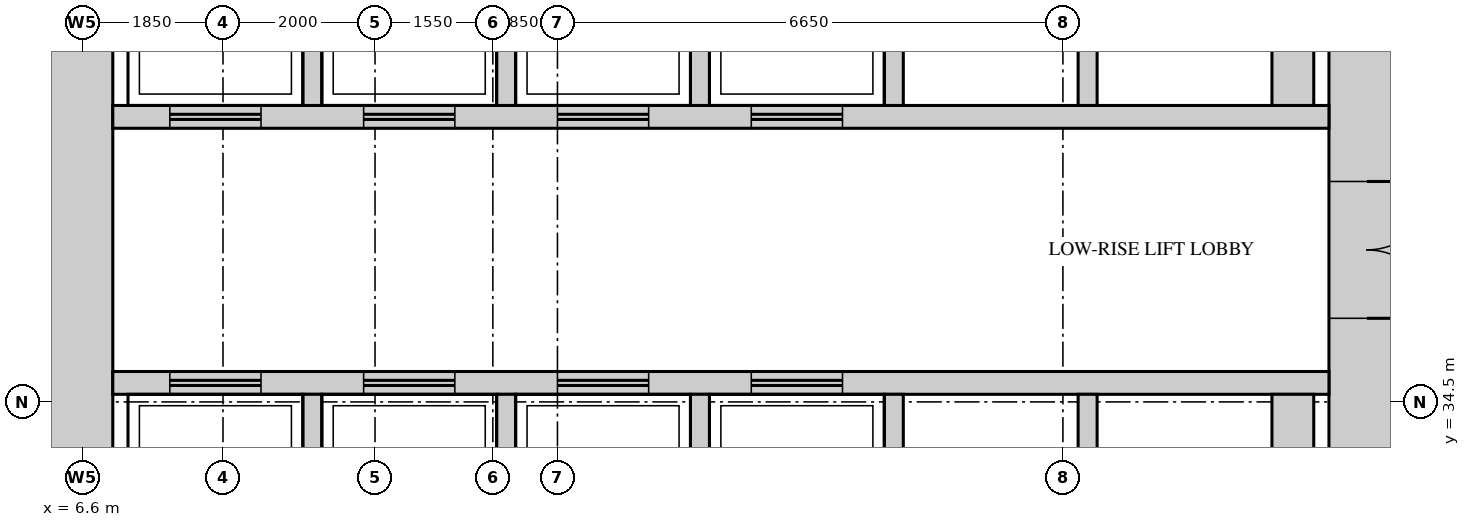
"""IFC4 building model, lengths in metres.
Left out: names, types, materials, properties, quantities, classifications, styles, units other than length and angle.
Written with IfcOpenShell. Run it as: python <this file> out.ifc"""

import sys

from ifc_helpers import new_model, si_unit, direction, frame, frame_2d, origin, place, context, subcontext, project, spatial, rectangle, extrude, source, transform, mapped, element, fill, save


model = new_model("IFC4")
c1 = context("Model", 3, precision=1e-05, world=origin(), true_north=direction((0.0, 1.0)))
c2 = subcontext(c1, "Body", "Model", "MODEL_VIEW")
j1 = project(units=[si_unit("LENGTHUNIT", "METRE"), si_unit("PLANEANGLEUNIT", "RADIAN")], contexts=[c1])
p1 = place(None, origin())
s1 = spatial("IfcSite", under=j1, at=p1, CompositionType="ELEMENT")
p2 = place(p1, origin())
s2 = spatial("IfcBuilding", under=s1, at=p2, CompositionType="ELEMENT")
p3 = place(p2, frame((0.0, 0.0, 132.3)))
s3 = spatial("IfcBuildingStorey", under=s2, at=p3, CompositionType="ELEMENT", Elevation=132.3)
m1 = source(origin(), c2, "Body", "SweptSolid", [
    extrude(rectangle(XDim=28.0, YDim=1.0, at=frame_2d((14.0, 0.0))), origin(), (0.0, 0.0, 1.0), 4.1),
])
p4 = place(p3, frame((23.5, 13.0, 0.0), z_axis=(0.0, 0.0, 1.0), x_axis=(0.0, 1.0, 0.0)))
e1 = element("IfcWall", 1, at=p4, inside=s3, PredefinedType="SHEAR", context=c2, shape_type="MappedRepresentation", body=[
    mapped(m1, transform((0.0, 0.0, 0.0))),
])
m2 = source(origin(), c2, "Body", "SweptSolid", [
    extrude(rectangle(XDim=1.8, YDim=2.1, at=frame_2d((0.9, 1.05))), frame((0.0, 0.51, 0.0), z_axis=(0.0, -1.0, 0.0), x_axis=(1.0, 0.0, 0.0)), (0.0, 0.0, 1.0), 1.02),
])
p5 = place(p4, frame((22.6, 0.0, 0.0)))
e2 = element("IfcOpeningElement", 2, at=p5, cuts=e1, PredefinedType="OPENING", context=c2, shape_type="MappedRepresentation", body=[
    mapped(m2, transform((0.0, 0.0, 0.0))),
])
m3 = source(origin(), c2, "Body", "SweptSolid", [
    extrude(rectangle(XDim=1.2, YDim=2.1, at=frame_2d((0.6, 1.05))), frame((0.0, 0.51, 0.0), z_axis=(0.0, -1.0, 0.0), x_axis=(1.0, 0.0, 0.0)), (0.0, 0.0, 1.0), 1.02),
])
p6 = place(p4, frame((15.35, 0.0, 0.0)))
e3 = element("IfcOpeningElement", 3, at=p6, cuts=e1, PredefinedType="OPENING", context=c2, shape_type="MappedRepresentation", body=[
    mapped(m3, transform((0.0, 0.0, 0.0))),
])
m4 = source(origin(), c2, "Body", "SweptSolid", [
    extrude(rectangle(XDim=0.9, YDim=2.1, at=frame_2d((0.45, 1.05))), frame((0.0, 0.51, 0.0), z_axis=(0.0, -1.0, 0.0), x_axis=(1.0, 0.0, 0.0)), (0.0, 0.0, 1.0), 1.02),
])
p7 = place(p4, frame((1.35, 0.0, 0.0)))
e4 = element("IfcOpeningElement", 4, at=p7, cuts=e1, PredefinedType="OPENING", context=c2, shape_type="MappedRepresentation", body=[
    mapped(m4, transform((0.0, 0.0, 0.0))),
])
p8 = place(p4, frame((4.55, 0.0, 0.0)))
e5 = element("IfcOpeningElement", 5, at=p8, cuts=e1, PredefinedType="OPENING", context=c2, shape_type="MappedRepresentation", body=[
    mapped(m4, transform((0.0, 0.0, 0.0))),
])
p9 = place(p4, frame((7.8, 0.0, 0.0)))
e6 = element("IfcOpeningElement", 6, at=p9, cuts=e1, PredefinedType="OPENING", context=c2, shape_type="MappedRepresentation", body=[
    mapped(m4, transform((0.0, 0.0, 0.0))),
])
p10 = place(p3, frame((6.5, 13.0, 0.0), z_axis=(0.0, 0.0, 1.0), x_axis=(0.0, 1.0, 0.0)))
e7 = element("IfcWall", 7, at=p10, inside=s3, PredefinedType="SHEAR", context=c2, shape_type="MappedRepresentation", body=[
    mapped(m1, transform((0.0, 0.0, 0.0))),
])
m5 = source(origin(), c2, "Body", "SweptSolid", [
    extrude(rectangle(XDim=16.0, YDim=0.3, at=frame_2d((8.0, 0.0))), origin(), (0.0, 0.0, 1.0), 4.1),
])
p11 = place(p3, frame((7.0, 38.25, 0.0), z_axis=(0.0, 0.0, 1.0), x_axis=(1.0, 0.0, 0.0)))
e8 = element("IfcWall", 8, at=p11, inside=s3, PredefinedType="STANDARD", context=c2, shape_type="MappedRepresentation", body=[
    mapped(m5, transform((0.0, 0.0, 0.0))),
])
m6 = source(origin(), c2, "Body", "SweptSolid", [
    extrude(rectangle(XDim=1.2, YDim=2.1, at=frame_2d((0.6, 1.05))), frame((0.0, 0.16, 0.0), z_axis=(0.0, -1.0, 0.0), x_axis=(1.0, 0.0, 0.0)), (0.0, 0.0, 1.0), 0.32),
])
p12 = place(p11, frame((0.75, 0.0, 0.0)))
e9 = element("IfcOpeningElement", 9, at=p12, cuts=e8, PredefinedType="OPENING", context=c2, shape_type="MappedRepresentation", body=[
    mapped(m6, transform((0.0, 0.0, 0.0))),
])
p13 = place(p11, frame((3.3, 0.0, 0.0)))
e10 = element("IfcOpeningElement", 10, at=p13, cuts=e8, PredefinedType="OPENING", context=c2, shape_type="MappedRepresentation", body=[
    mapped(m6, transform((0.0, 0.0, 0.0))),
])
p14 = place(p11, frame((5.85, 0.0, 0.0)))
e11 = element("IfcOpeningElement", 11, at=p14, cuts=e8, PredefinedType="OPENING", context=c2, shape_type="MappedRepresentation", body=[
    mapped(m6, transform((0.0, 0.0, 0.0))),
])
p15 = place(p11, frame((8.4, 0.0, 0.0)))
e12 = element("IfcOpeningElement", 12, at=p15, cuts=e8, PredefinedType="OPENING", context=c2, shape_type="MappedRepresentation", body=[
    mapped(m6, transform((0.0, 0.0, 0.0))),
])
p16 = place(p3, frame((7.0, 34.75, 0.0), z_axis=(0.0, 0.0, 1.0), x_axis=(1.0, 0.0, 0.0)))
e13 = element("IfcWall", 13, at=p16, inside=s3, PredefinedType="STANDARD", context=c2, shape_type="MappedRepresentation", body=[
    mapped(m5, transform((0.0, 0.0, 0.0))),
])
p17 = place(p16, frame((0.75, 0.0, 0.0)))
e14 = element("IfcOpeningElement", 14, at=p17, cuts=e13, PredefinedType="OPENING", context=c2, shape_type="MappedRepresentation", body=[
    mapped(m6, transform((0.0, 0.0, 0.0))),
])
p18 = place(p16, frame((3.3, 0.0, 0.0)))
e15 = element("IfcOpeningElement", 15, at=p18, cuts=e13, PredefinedType="OPENING", context=c2, shape_type="MappedRepresentation", body=[
    mapped(m6, transform((0.0, 0.0, 0.0))),
])
p19 = place(p16, frame((5.85, 0.0, 0.0)))
e16 = element("IfcOpeningElement", 16, at=p19, cuts=e13, PredefinedType="OPENING", context=c2, shape_type="MappedRepresentation", body=[
    mapped(m6, transform((0.0, 0.0, 0.0))),
])
p20 = place(p16, frame((8.4, 0.0, 0.0)))
e17 = element("IfcOpeningElement", 17, at=p20, cuts=e13, PredefinedType="OPENING", context=c2, shape_type="MappedRepresentation", body=[
    mapped(m6, transform((0.0, 0.0, 0.0))),
])
m7 = source(origin(), c2, "Body", "SweptSolid", [
    extrude(rectangle(XDim=2.6, YDim=0.25, at=frame_2d((1.3, 0.0))), origin(), (0.0, 0.0, 1.0), 4.1),
])
for number, where, z_axis, x_axis in (
    (18, (9.625, 38.4, 0.0), (0.0, 0.0, 1.0), (0.0, 1.0, 0.0)),
    (19, (12.175, 38.4, 0.0), (0.0, 0.0, 1.0), (0.0, 1.0, 0.0)),
    (20, (14.725, 38.4, 0.0), (0.0, 0.0, 1.0), (0.0, 1.0, 0.0)),
    (21, (17.275, 38.4, 0.0), (0.0, 0.0, 1.0), (0.0, 1.0, 0.0)),
    (22, (19.825, 38.4, 0.0), (0.0, 0.0, 1.0), (0.0, 1.0, 0.0)),
):
    element("IfcWall", number, at=place(p3, frame(where, z_axis=z_axis, x_axis=x_axis)), inside=s3, PredefinedType="STANDARD", context=c2, shape_type="MappedRepresentation", body=[
        mapped(m7, transform((0.0, 0.0, 0.0))),
    ])
m8 = source(origin(), c2, "Body", "SweptSolid", [
    extrude(rectangle(XDim=2.6, YDim=0.55, at=frame_2d((1.3, 0.0))), origin(), (0.0, 0.0, 1.0), 4.1),
])
p21 = place(p3, frame((22.525, 38.4, 0.0), z_axis=(0.0, 0.0, 1.0), x_axis=(0.0, 1.0, 0.0)))
e23 = element("IfcWall", 23, at=p21, inside=s3, PredefinedType="STANDARD", context=c2, shape_type="MappedRepresentation", body=[
    mapped(m8, transform((0.0, 0.0, 0.0))),
])
m9 = source(origin(), c2, "Body", "SweptSolid", [
    extrude(rectangle(XDim=2.4, YDim=0.25, at=frame_2d((1.2, 0.0))), origin(), (0.0, 0.0, 1.0), 4.1),
])
for number, where, z_axis, x_axis in (
    (24, (9.625, 32.2, 0.0), (0.0, 0.0, 1.0), (0.0, 1.0, 0.0)),
    (25, (12.175, 32.2, 0.0), (0.0, 0.0, 1.0), (0.0, 1.0, 0.0)),
    (26, (14.725, 32.2, 0.0), (0.0, 0.0, 1.0), (0.0, 1.0, 0.0)),
    (27, (17.275, 32.2, 0.0), (0.0, 0.0, 1.0), (0.0, 1.0, 0.0)),
    (28, (19.825, 32.2, 0.0), (0.0, 0.0, 1.0), (0.0, 1.0, 0.0)),
):
    element("IfcWall", number, at=place(p3, frame(where, z_axis=z_axis, x_axis=x_axis)), inside=s3, PredefinedType="STANDARD", context=c2, shape_type="MappedRepresentation", body=[
        mapped(m9, transform((0.0, 0.0, 0.0))),
    ])
m10 = source(origin(), c2, "Body", "SweptSolid", [
    extrude(rectangle(XDim=2.4, YDim=0.55, at=frame_2d((1.2, 0.0))), origin(), (0.0, 0.0, 1.0), 4.1),
])
p22 = place(p3, frame((22.525, 32.2, 0.0), z_axis=(0.0, 0.0, 1.0), x_axis=(0.0, 1.0, 0.0)))
e29 = element("IfcWall", 29, at=p22, inside=s3, PredefinedType="STANDARD", context=c2, shape_type="MappedRepresentation", body=[
    mapped(m10, transform((0.0, 0.0, 0.0))),
])
m11 = source(origin(), c2, "Body", "SweptSolid", [
    extrude(rectangle(XDim=1.8, YDim=2.1, at=frame_2d((0.9, 1.05))), frame((0.0, 0.45, 0.0), z_axis=(0.0, -1.0, 0.0), x_axis=(1.0, 0.0, 0.0)), (0.0, 0.0, 1.0), 0.9),
])
p23 = place(p5, origin())
e30 = element("IfcDoor", 30, at=p23, inside=s3, OperationType="DOUBLE_DOOR_SINGLE_SWING", PredefinedType="DOOR", context=c2, shape_type="MappedRepresentation", body=[
    mapped(m11, transform((0.0, 0.0, 0.0))),
])
fill(e2, e30)
m12 = source(origin(), c2, "Body", "SweptSolid", [
    extrude(rectangle(XDim=1.2, YDim=2.1, at=frame_2d((0.6, 1.05))), frame((0.0, 0.025, 0.0), z_axis=(0.0, -1.0, 0.0), x_axis=(1.0, 0.0, 0.0)), (0.0, 0.0, 1.0), 0.05),
])
p24 = place(p17, origin())
e31 = element("IfcDoor", 31, at=p24, inside=s3, OperationType="DOUBLE_DOOR_SLIDING", PredefinedType="DOOR", context=c2, shape_type="MappedRepresentation", body=[
    mapped(m12, transform((0.0, 0.0, 0.0))),
])
fill(e14, e31)
p25 = place(p18, origin())
e32 = element("IfcDoor", 32, at=p25, inside=s3, OperationType="DOUBLE_DOOR_SLIDING", PredefinedType="DOOR", context=c2, shape_type="MappedRepresentation", body=[
    mapped(m12, transform((0.0, 0.0, 0.0))),
])
fill(e15, e32)
p26 = place(p19, origin())
e33 = element("IfcDoor", 33, at=p26, inside=s3, OperationType="DOUBLE_DOOR_SLIDING", PredefinedType="DOOR", context=c2, shape_type="MappedRepresentation", body=[
    mapped(m12, transform((0.0, 0.0, 0.0))),
])
fill(e16, e33)
p27 = place(p20, origin())
e34 = element("IfcDoor", 34, at=p27, inside=s3, OperationType="DOUBLE_DOOR_SLIDING", PredefinedType="DOOR", context=c2, shape_type="MappedRepresentation", body=[
    mapped(m12, transform((0.0, 0.0, 0.0))),
])
fill(e17, e34)
p28 = place(p12, origin())
e35 = element("IfcDoor", 35, at=p28, inside=s3, OperationType="DOUBLE_DOOR_SLIDING", PredefinedType="DOOR", context=c2, shape_type="MappedRepresentation", body=[
    mapped(m12, transform((0.0, 0.0, 0.0))),
])
fill(e9, e35)
p29 = place(p13, origin())
e36 = element("IfcDoor", 36, at=p29, inside=s3, OperationType="DOUBLE_DOOR_SLIDING", PredefinedType="DOOR", context=c2, shape_type="MappedRepresentation", body=[
    mapped(m12, transform((0.0, 0.0, 0.0))),
])
fill(e10, e36)
p30 = place(p14, origin())
e37 = element("IfcDoor", 37, at=p30, inside=s3, OperationType="DOUBLE_DOOR_SLIDING", PredefinedType="DOOR", context=c2, shape_type="MappedRepresentation", body=[
    mapped(m12, transform((0.0, 0.0, 0.0))),
])
fill(e11, e37)
p31 = place(p15, origin())
e38 = element("IfcDoor", 38, at=p31, inside=s3, OperationType="DOUBLE_DOOR_SLIDING", PredefinedType="DOOR", context=c2, shape_type="MappedRepresentation", body=[
    mapped(m12, transform((0.0, 0.0, 0.0))),
])
fill(e12, e38)
save(model, sys.argv[1])
